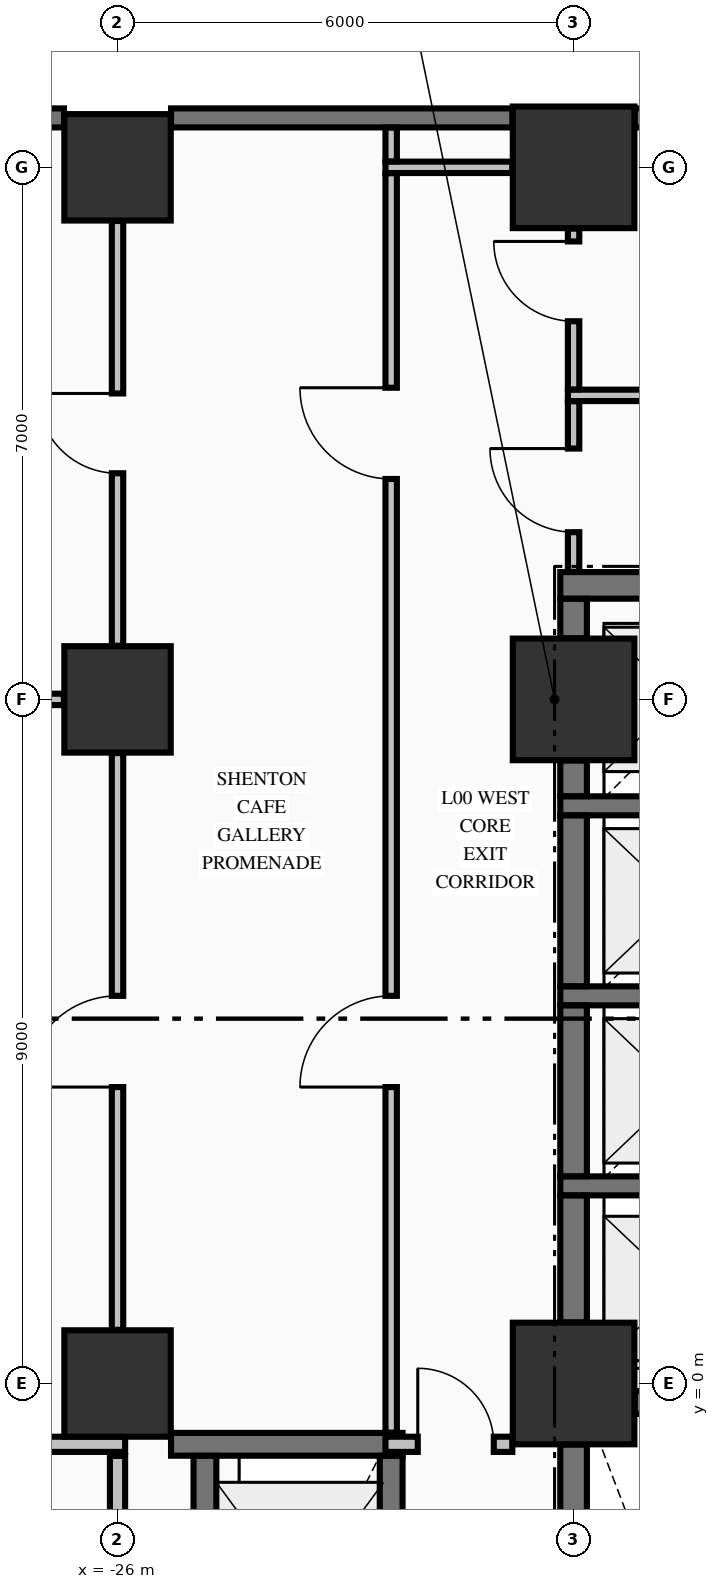
"""IFC4 building model, lengths in metres.
Left out: names, types, materials, properties, quantities, classifications, styles, units other than length and angle.
Written with IfcOpenShell. Run it as: python <this file> out.ifc"""

import sys

from ifc_helpers import new_model, si_unit, direction, frame, frame_2d, origin, origin_2d, place, context, subcontext, project, spatial, rectangle, extrude, element, fill, save


model = new_model("IFC4")
c1 = context("Model", 3, precision=1e-05, world=origin(), true_north=direction((0.0, 1.0)))
c2 = subcontext(c1, "Body", "Model", "MODEL_VIEW")
j1 = project(units=[si_unit("LENGTHUNIT", "METRE"), si_unit("PLANEANGLEUNIT", "RADIAN")], contexts=[c1])
p1 = place(None, origin())
s1 = spatial("IfcSite", under=j1, at=p1, CompositionType="ELEMENT")
p2 = place(p1, origin())
s2 = spatial("IfcBuilding", under=s1, at=p2, CompositionType="ELEMENT")
p3 = place(p2, origin())
s3 = spatial("IfcBuildingStorey", under=s2, at=p3, CompositionType="ELEMENT", Elevation=0.0)
for number, where, z_axis, x_axis in (
    (1, (-26.0, 0.0, 0.0), (0.0, 0.0, 1.0), (1.0, 0.0, 0.0)),
    (2, (-26.0, 9.0, 0.0), (0.0, 0.0, 1.0), (1.0, 0.0, 0.0)),
    (3, (-26.0, 16.0, 0.0), (0.0, 0.0, 1.0), (1.0, 0.0, 0.0)),
):
    element("IfcColumn", number, at=place(p3, frame(where, z_axis=z_axis, x_axis=x_axis)), inside=s3, PredefinedType="COLUMN", context=c2, shape_type="SweptSolid", body=[
        extrude(rectangle(XDim=1.4, YDim=1.4, at=origin_2d()), origin(), (0.0, 0.0, 1.0), 5.09),
    ])
for number, where, z_axis, x_axis in (
    (4, (-20.0, 0.0, 0.0), (0.0, 0.0, 1.0), (1.0, 0.0, 0.0)),
    (5, (-20.0, 9.0, 0.0), (0.0, 0.0, 1.0), (1.0, 0.0, 0.0)),
    (6, (-20.0, 16.0, 0.0), (0.0, 0.0, 1.0), (1.0, 0.0, 0.0)),
):
    element("IfcColumn", number, at=place(p3, frame(where, z_axis=z_axis, x_axis=x_axis)), inside=s3, PredefinedType="COLUMN", context=c2, shape_type="SweptSolid", body=[
        extrude(rectangle(XDim=1.6, YDim=1.6, at=origin_2d()), origin(), (0.0, 0.0, 1.0), 5.09),
    ])
p4 = place(p3, frame((-25.296, -0.8, 0.0), z_axis=(0.0, 0.0, 1.0), x_axis=(1.0, 0.0, 0.0)))
e7 = element("IfcWall", 7, at=p4, inside=s3, PredefinedType="SHEAR", context=c2, shape_type="SweptSolid", body=[
    extrude(rectangle(XDim=3.046, YDim=0.3, at=frame_2d((1.523, 0.0))), origin(), (0.0, 0.0, 1.0), 5.09),
])
p5 = place(p3, frame((-19.196, -0.25, 0.0), z_axis=(0.0, 0.0, 1.0), x_axis=(1.0, 0.0, 0.0)))
e8 = element("IfcWall", 8, at=p5, inside=s3, PredefinedType="SHEAR", context=c2, shape_type="SweptSolid", body=[
    extrude(rectangle(XDim=7.392, YDim=0.3, at=frame_2d((3.696, 0.0))), origin(), (0.0, 0.0, 1.0), 5.09),
])
p6 = place(p5, frame((5.496, 0.0, 0.0)))
e9 = element("IfcOpeningElement", 9, at=p6, cuts=e8, PredefinedType="OPENING", context=c2, shape_type="SweptSolid", body=[
    extrude(rectangle(XDim=1.1, YDim=2.15, at=frame_2d((0.55, 1.075))), frame((0.0, 0.16, 0.0), z_axis=(0.0, -1.0, 0.0), x_axis=(1.0, 0.0, 0.0)), (0.0, 0.0, 1.0), 0.32),
])
for number, where, z_axis, x_axis in (
    (10, (-20.175, 2.6, 0.0), (0.0, 0.0, 1.0), (1.0, 0.0, 0.0)),
    (11, (-20.175, 5.1, 0.0), (0.0, 0.0, 1.0), (1.0, 0.0, 0.0)),
    (12, (-20.175, 7.6, 0.0), (0.0, 0.0, 1.0), (1.0, 0.0, 0.0)),
):
    element("IfcWall", number, at=place(p3, frame(where, z_axis=z_axis, x_axis=x_axis)), inside=s3, PredefinedType="SOLIDWALL", context=c2, shape_type="SweptSolid", body=[
        extrude(rectangle(XDim=3.1, YDim=0.25, at=frame_2d((1.55, 0.0))), origin(), (0.0, 0.0, 1.0), 5.09),
    ])
p7 = place(p3, frame((-20.175, 10.5, 0.0), z_axis=(0.0, 0.0, 1.0), x_axis=(1.0, 0.0, 0.0)))
e13 = element("IfcWall", 13, at=p7, inside=s3, PredefinedType="SHEAR", context=c2, shape_type="SweptSolid", body=[
    extrude(rectangle(XDim=5.475, YDim=0.35, at=frame_2d((2.738, 0.0))), origin(), (0.0, 0.0, 1.0), 5.09),
])
p8 = place(p7, frame((3.575, 0.0, 0.0)))
e14 = element("IfcOpeningElement", 14, at=p8, cuts=e13, PredefinedType="OPENING", context=c2, shape_type="SweptSolid", body=[
    extrude(rectangle(XDim=1.2, YDim=2.15, at=frame_2d((0.6, 1.075))), frame((0.0, 0.185, 0.0), z_axis=(0.0, -1.0, 0.0), x_axis=(1.0, 0.0, 0.0)), (0.0, 0.0, 1.0), 0.37),
])
p9 = place(p3, frame((-29.296, 16.65, 0.0), z_axis=(0.0, 0.0, 1.0), x_axis=(1.0, 0.0, 0.0)))
e15 = element("IfcWall", 15, at=p9, inside=s3, PredefinedType="SOLIDWALL", context=c2, shape_type="SweptSolid", body=[
    extrude(rectangle(XDim=2.592, YDim=0.25, at=frame_2d((1.296, 0.0))), origin(), (0.0, 0.0, 1.0), 5.09),
])
p10 = place(p3, frame((-25.296, 16.65, 0.0), z_axis=(0.0, 0.0, 1.0), x_axis=(1.0, 0.0, 0.0)))
e16 = element("IfcWall", 16, at=p10, inside=s3, PredefinedType="SOLIDWALL", context=c2, shape_type="SweptSolid", body=[
    extrude(rectangle(XDim=4.492, YDim=0.25, at=frame_2d((2.246, 0.0))), origin(), (0.0, 0.0, 1.0), 5.09),
])
p11 = place(p3, frame((-19.196, 16.65, 0.0), z_axis=(0.0, 0.0, 1.0), x_axis=(1.0, 0.0, 0.0)))
e17 = element("IfcWall", 17, at=p11, inside=s3, PredefinedType="SOLIDWALL", context=c2, shape_type="SweptSolid", body=[
    extrude(rectangle(XDim=7.392, YDim=0.25, at=frame_2d((3.696, 0.0))), origin(), (0.0, 0.0, 1.0), 5.09),
])
p12 = place(p3, frame((-33.835, -0.8, 0.0), z_axis=(0.0, 0.0, 1.0), x_axis=(1.0, 0.0, 0.0)))
e18 = element("IfcWall", 18, at=p12, inside=s3, PredefinedType="PARTITIONING", context=c2, shape_type="SweptSolid", body=[
    extrude(rectangle(XDim=7.935, YDim=0.2, at=frame_2d((3.968, 0.0))), origin(), (0.0, 0.0, 1.0), 5.09),
])
p13 = place(p3, frame((-22.475, -0.8, 0.0), z_axis=(0.0, 0.0, 1.0), x_axis=(1.0, 0.0, 0.0)))
e19 = element("IfcWall", 19, at=p13, inside=s3, PredefinedType="PARTITIONING", context=c2, shape_type="SweptSolid", body=[
    extrude(rectangle(XDim=1.669, YDim=0.2, at=frame_2d((0.834, 0.0))), origin(), (0.0, 0.0, 1.0), 5.09),
])
p14 = place(p13, frame((0.425, 0.0, 0.0)))
e20 = element("IfcOpeningElement", 20, at=p14, cuts=e19, PredefinedType="OPENING", context=c2, shape_type="SweptSolid", body=[
    extrude(rectangle(XDim=1.0, YDim=2.15, at=frame_2d((0.5, 1.075))), frame((0.0, 0.11, 0.0), z_axis=(0.0, -1.0, 0.0), x_axis=(1.0, 0.0, 0.0)), (0.0, 0.0, 1.0), 0.22),
])
p15 = place(p3, frame((-29.294, 9.0, 0.0), z_axis=(0.0, 0.0, 1.0), x_axis=(1.0, 0.0, 0.0)))
e21 = element("IfcWall", 21, at=p15, inside=s3, PredefinedType="PARTITIONING", context=c2, shape_type="SweptSolid", body=[
    extrude(rectangle(XDim=2.588, YDim=0.15, at=frame_2d((1.294, 0.0))), origin(), (0.0, 0.0, 1.0), 4.132),
])
p16 = place(p3, frame((-20.075, 13.0, 0.0), z_axis=(0.0, 0.0, 1.0), x_axis=(1.0, 0.0, 0.0)))
e22 = element("IfcWall", 22, at=p16, inside=s3, PredefinedType="PARTITIONING", context=c2, shape_type="SweptSolid", body=[
    extrude(rectangle(XDim=11.31, YDim=0.15, at=frame_2d((5.655, 0.0))), origin(), (0.0, 0.0, 1.0), 5.09),
])
p17 = place(p16, frame((4.025, 0.0, 0.0)))
e23 = element("IfcOpeningElement", 23, at=p17, cuts=e22, PredefinedType="OPENING", context=c2, shape_type="SweptSolid", body=[
    extrude(rectangle(XDim=1.1, YDim=2.15, at=frame_2d((0.55, 1.075))), frame((0.0, 0.085, 0.0), z_axis=(0.0, -1.0, 0.0), x_axis=(1.0, 0.0, 0.0)), (0.0, 0.0, 1.0), 0.17),
])
p18 = place(p16, frame((9.725, 0.0, 0.0)))
e24 = element("IfcOpeningElement", 24, at=p18, cuts=e22, PredefinedType="OPENING", context=c2, shape_type="SweptSolid", body=[
    extrude(rectangle(XDim=1.1, YDim=2.15, at=frame_2d((0.55, 1.075))), frame((0.0, 0.085, 0.0), z_axis=(0.0, -1.0, 0.0), x_axis=(1.0, 0.0, 0.0)), (0.0, 0.0, 1.0), 0.17),
])
p19 = place(p3, frame((-22.475, 16.0, 0.0), z_axis=(0.0, 0.0, 1.0), x_axis=(1.0, 0.0, 0.0)))
e25 = element("IfcWall", 25, at=p19, inside=s3, PredefinedType="PARTITIONING", context=c2, shape_type="SweptSolid", body=[
    extrude(rectangle(XDim=1.669, YDim=0.15, at=frame_2d((0.834, 0.0))), origin(), (0.0, 0.0, 1.0), 4.132),
])
p20 = place(p3, frame((-24.85, -4.648, 0.0), z_axis=(0.0, 0.0, 1.0), x_axis=(0.0, 1.0, 0.0)))
e26 = element("IfcWall", 26, at=p20, inside=s3, PredefinedType="SHEAR", context=c2, shape_type="SweptSolid", body=[
    extrude(rectangle(XDim=3.696, YDim=0.3, at=frame_2d((1.848, 0.0))), origin(), (0.0, 0.0, 1.0), 5.09),
])
p21 = place(p3, frame((-22.4, -4.648, 0.0), z_axis=(0.0, 0.0, 1.0), x_axis=(0.0, 1.0, 0.0)))
e27 = element("IfcWall", 27, at=p21, inside=s3, PredefinedType="SHEAR", context=c2, shape_type="SweptSolid", body=[
    extrude(rectangle(XDim=3.696, YDim=0.3, at=frame_2d((1.848, 0.0))), origin(), (0.0, 0.0, 1.0), 5.09),
])
p22 = place(p21, frame((1.198, 0.0, 0.0)))
e28 = element("IfcOpeningElement", 28, at=p22, cuts=e27, PredefinedType="OPENING", context=c2, shape_type="SweptSolid", body=[
    extrude(rectangle(XDim=1.3, YDim=2.3, at=frame_2d((0.65, 1.15))), frame((0.0, 0.16, 0.0), z_axis=(0.0, -1.0, 0.0), x_axis=(1.0, 0.0, 0.0)), (0.0, 0.0, 1.0), 0.32),
])
p23 = place(p3, frame((-20.0, -8.196, 0.0), z_axis=(0.0, 0.0, 1.0), x_axis=(0.0, 1.0, 0.0)))
e29 = element("IfcWall", 29, at=p23, inside=s3, PredefinedType="SHEAR", context=c2, shape_type="SweptSolid", body=[
    extrude(rectangle(XDim=7.392, YDim=0.35, at=frame_2d((3.696, 0.0))), origin(), (0.0, 0.0, 1.0), 5.09),
])
p24 = place(p3, frame((-20.0, 0.804, 0.0), z_axis=(0.0, 0.0, 1.0), x_axis=(0.0, 1.0, 0.0)))
e30 = element("IfcWall", 30, at=p24, inside=s3, PredefinedType="SHEAR", context=c2, shape_type="SweptSolid", body=[
    extrude(rectangle(XDim=1.669, YDim=0.35, at=frame_2d((0.834, 0.0))), origin(), (0.0, 0.0, 1.0), 5.09),
])
for number, where, z_axis, x_axis in (
    (31, (-20.0, 2.727, 0.0), (0.0, 0.0, 1.0), (0.0, 1.0, 0.0)),
    (32, (-20.0, 5.227, 0.0), (0.0, 0.0, 1.0), (0.0, 1.0, 0.0)),
):
    element("IfcWall", number, at=place(p3, frame(where, z_axis=z_axis, x_axis=x_axis)), inside=s3, PredefinedType="SHEAR", context=c2, shape_type="SweptSolid", body=[
        extrude(rectangle(XDim=2.246, YDim=0.35, at=frame_2d((1.123, 0.0))), origin(), (0.0, 0.0, 1.0), 5.09),
    ])
p25 = place(p3, frame((-20.0, 7.727, 0.0), z_axis=(0.0, 0.0, 1.0), x_axis=(0.0, 1.0, 0.0)))
e33 = element("IfcWall", 33, at=p25, inside=s3, PredefinedType="SHEAR", context=c2, shape_type="SweptSolid", body=[
    extrude(rectangle(XDim=0.469, YDim=0.35, at=frame_2d((0.234, 0.0))), origin(), (0.0, 0.0, 1.0), 5.09),
])
p26 = place(p3, frame((-20.0, 9.804, 0.0), z_axis=(0.0, 0.0, 1.0), x_axis=(0.0, 1.0, 0.0)))
e34 = element("IfcWall", 34, at=p26, inside=s3, PredefinedType="SHEAR", context=c2, shape_type="SweptSolid", body=[
    extrude(rectangle(XDim=0.519, YDim=0.35, at=frame_2d((0.26, 0.0))), origin(), (0.0, 0.0, 1.0), 5.09),
])
p27 = place(p3, frame((-26.0, -8.294, 0.0), z_axis=(0.0, 0.0, 1.0), x_axis=(0.0, 1.0, 0.0)))
e35 = element("IfcWall", 35, at=p27, inside=s3, PredefinedType="PARTITIONING", context=c2, shape_type="SweptSolid", body=[
    extrude(rectangle(XDim=7.341, YDim=0.2, at=frame_2d((3.67, 0.0))), origin(), (0.0, 0.0, 1.0), 4.132),
])
p28 = place(p3, frame((-26.0, 0.706, 0.0), z_axis=(0.0, 0.0, 1.0), x_axis=(0.0, 1.0, 0.0)))
e36 = element("IfcWall", 36, at=p28, inside=s3, PredefinedType="PARTITIONING", context=c2, shape_type="SweptSolid", body=[
    extrude(rectangle(XDim=7.588, YDim=0.15, at=frame_2d((3.794, 0.0))), origin(), (0.0, 0.0, 1.0), 4.132),
])
p29 = place(p28, frame((3.194, 0.0, 0.0)))
e37 = element("IfcOpeningElement", 37, at=p29, cuts=e36, PredefinedType="OPENING", context=c2, shape_type="SweptSolid", body=[
    extrude(rectangle(XDim=1.2, YDim=2.15, at=frame_2d((0.6, 1.075))), frame((0.0, 0.085, 0.0), z_axis=(0.0, -1.0, 0.0), x_axis=(1.0, 0.0, 0.0)), (0.0, 0.0, 1.0), 0.17),
])
p30 = place(p3, frame((-26.0, 9.706, 0.0), z_axis=(0.0, 0.0, 1.0), x_axis=(0.0, 1.0, 0.0)))
e38 = element("IfcWall", 38, at=p30, inside=s3, PredefinedType="PARTITIONING", context=c2, shape_type="SweptSolid", body=[
    extrude(rectangle(XDim=5.588, YDim=0.15, at=frame_2d((2.794, 0.0))), origin(), (0.0, 0.0, 1.0), 4.132),
])
p31 = place(p30, frame((2.269, 0.0, 0.0)))
e39 = element("IfcOpeningElement", 39, at=p31, cuts=e38, PredefinedType="OPENING", context=c2, shape_type="SweptSolid", body=[
    extrude(rectangle(XDim=1.05, YDim=2.15, at=frame_2d((0.525, 1.075))), frame((0.0, 0.085, 0.0), z_axis=(0.0, -1.0, 0.0), x_axis=(1.0, 0.0, 0.0)), (0.0, 0.0, 1.0), 0.17),
])
p32 = place(p3, frame((-22.4, -0.647, 0.0), z_axis=(0.0, 0.0, 1.0), x_axis=(0.0, 1.0, 0.0)))
e40 = element("IfcWall", 40, at=p32, inside=s3, PredefinedType="PARTITIONING", context=c2, shape_type="SweptSolid", body=[
    extrude(rectangle(XDim=16.569, YDim=0.15, at=frame_2d((8.285, 0.0))), origin(), (0.0, 0.0, 1.0), 5.09),
])
p33 = place(p32, frame((4.547, 0.0, 0.0)))
e41 = element("IfcOpeningElement", 41, at=p33, cuts=e40, PredefinedType="OPENING", context=c2, shape_type="SweptSolid", body=[
    extrude(rectangle(XDim=1.2, YDim=2.15, at=frame_2d((0.6, 1.075))), frame((0.0, 0.085, 0.0), z_axis=(0.0, -1.0, 0.0), x_axis=(1.0, 0.0, 0.0)), (0.0, 0.0, 1.0), 0.17),
])
p34 = place(p32, frame((12.547, 0.0, 0.0)))
e42 = element("IfcOpeningElement", 42, at=p34, cuts=e40, PredefinedType="OPENING", context=c2, shape_type="SweptSolid", body=[
    extrude(rectangle(XDim=1.2, YDim=2.15, at=frame_2d((0.6, 1.075))), frame((0.0, 0.085, 0.0), z_axis=(0.0, -1.0, 0.0), x_axis=(1.0, 0.0, 0.0)), (0.0, 0.0, 1.0), 0.17),
])
p35 = place(p3, frame((-22.4, 16.078, 0.0), z_axis=(0.0, 0.0, 1.0), x_axis=(0.0, 1.0, 0.0)))
e43 = element("IfcWall", 43, at=p35, inside=s3, PredefinedType="PARTITIONING", context=c2, shape_type="SweptSolid", body=[
    extrude(rectangle(XDim=0.444, YDim=0.15, at=frame_2d((0.222, 0.0))), origin(), (0.0, 0.0, 1.0), 5.09),
])
p36 = place(p3, frame((-20.0, 10.678, 0.0), z_axis=(0.0, 0.0, 1.0), x_axis=(0.0, 1.0, 0.0)))
e44 = element("IfcWall", 44, at=p36, inside=s3, PredefinedType="PARTITIONING", context=c2, shape_type="SweptSolid", body=[
    extrude(rectangle(XDim=2.244, YDim=0.15, at=frame_2d((1.122, 0.0))), origin(), (0.0, 0.0, 1.0), 4.132),
])
p37 = place(p36, frame((0.522, 0.0, 0.0)))
e45 = element("IfcOpeningElement", 45, at=p37, cuts=e44, PredefinedType="OPENING", context=c2, shape_type="SweptSolid", body=[
    extrude(rectangle(XDim=1.1, YDim=2.15, at=frame_2d((0.55, 1.075))), frame((0.0, 0.085, 0.0), z_axis=(0.0, -1.0, 0.0), x_axis=(1.0, 0.0, 0.0)), (0.0, 0.0, 1.0), 0.17),
])
p38 = place(p3, frame((-20.0, 13.078, 0.0), z_axis=(0.0, 0.0, 1.0), x_axis=(0.0, 1.0, 0.0)))
e46 = element("IfcWall", 46, at=p38, inside=s3, PredefinedType="PARTITIONING", context=c2, shape_type="SweptSolid", body=[
    extrude(rectangle(XDim=2.116, YDim=0.15, at=frame_2d((1.058, 0.0))), origin(), (0.0, 0.0, 1.0), 4.132),
])
p39 = place(p38, frame((0.897, 0.0, 0.0)))
e47 = element("IfcOpeningElement", 47, at=p39, cuts=e46, PredefinedType="OPENING", context=c2, shape_type="SweptSolid", body=[
    extrude(rectangle(XDim=1.05, YDim=2.15, at=frame_2d((0.525, 1.075))), frame((0.0, 0.085, 0.0), z_axis=(0.0, -1.0, 0.0), x_axis=(1.0, 0.0, 0.0)), (0.0, 0.0, 1.0), 0.17),
])
p40 = place(p14, origin())
e48 = element("IfcDoor", 48, at=p40, inside=s3, OperationType="SINGLE_SWING_LEFT", PredefinedType="DOOR", context=c2, shape_type="SweptSolid", body=[
    extrude(rectangle(XDim=1.0, YDim=2.15, at=frame_2d((0.5, 1.075))), frame((0.0, 0.025, 0.0), z_axis=(0.0, -1.0, 0.0), x_axis=(1.0, 0.0, 0.0)), (0.0, 0.0, 1.0), 0.05),
])
fill(e20, e48)
p41 = place(p39, origin())
e49 = element("IfcDoor", 49, at=p41, inside=s3, OperationType="SINGLE_SWING_RIGHT", PredefinedType="DOOR", context=c2, shape_type="SweptSolid", body=[
    extrude(rectangle(XDim=1.05, YDim=2.15, at=frame_2d((0.525, 1.075))), frame((0.0, 0.025, 0.0), z_axis=(0.0, -1.0, 0.0), x_axis=(1.0, 0.0, 0.0)), (0.0, 0.0, 1.0), 0.05),
])
fill(e47, e49)
p42 = place(p37, origin())
e50 = element("IfcDoor", 50, at=p42, inside=s3, OperationType="SINGLE_SWING_RIGHT", PredefinedType="DOOR", context=c2, shape_type="SweptSolid", body=[
    extrude(rectangle(XDim=1.1, YDim=2.15, at=frame_2d((0.55, 1.075))), frame((0.0, 0.025, 0.0), z_axis=(0.0, -1.0, 0.0), x_axis=(1.0, 0.0, 0.0)), (0.0, 0.0, 1.0), 0.05),
])
fill(e45, e50)
p43 = place(p33, origin())
e51 = element("IfcDoor", 51, at=p43, inside=s3, OperationType="SINGLE_SWING_LEFT", PredefinedType="DOOR", context=c2, shape_type="SweptSolid", body=[
    extrude(rectangle(XDim=1.2, YDim=2.15, at=frame_2d((0.6, 1.075))), frame((0.0, 0.025, 0.0), z_axis=(0.0, -1.0, 0.0), x_axis=(1.0, 0.0, 0.0)), (0.0, 0.0, 1.0), 0.05),
])
fill(e41, e51)
p44 = place(p34, origin())
e52 = element("IfcDoor", 52, at=p44, inside=s3, OperationType="SINGLE_SWING_RIGHT", PredefinedType="DOOR", context=c2, shape_type="SweptSolid", body=[
    extrude(rectangle(XDim=1.2, YDim=2.15, at=frame_2d((0.6, 1.075))), frame((0.0, 0.025, 0.0), z_axis=(0.0, -1.0, 0.0), x_axis=(1.0, 0.0, 0.0)), (0.0, 0.0, 1.0), 0.05),
])
fill(e42, e52)
p45 = place(p29, origin())
e53 = element("IfcDoor", 53, at=p45, inside=s3, OperationType="SINGLE_SWING_LEFT", PredefinedType="DOOR", context=c2, shape_type="SweptSolid", body=[
    extrude(rectangle(XDim=1.2, YDim=2.15, at=frame_2d((0.6, 1.075))), frame((0.0, 0.025, 0.0), z_axis=(0.0, -1.0, 0.0), x_axis=(1.0, 0.0, 0.0)), (0.0, 0.0, 1.0), 0.05),
])
fill(e37, e53)
p46 = place(p31, origin())
e54 = element("IfcDoor", 54, at=p46, inside=s3, OperationType="SINGLE_SWING_RIGHT", PredefinedType="DOOR", context=c2, shape_type="SweptSolid", body=[
    extrude(rectangle(XDim=1.05, YDim=2.15, at=frame_2d((0.525, 1.075))), frame((0.0, 0.025, 0.0), z_axis=(0.0, -1.0, 0.0), x_axis=(1.0, 0.0, 0.0)), (0.0, 0.0, 1.0), 0.05),
])
fill(e39, e54)
save(model, sys.argv[1])
